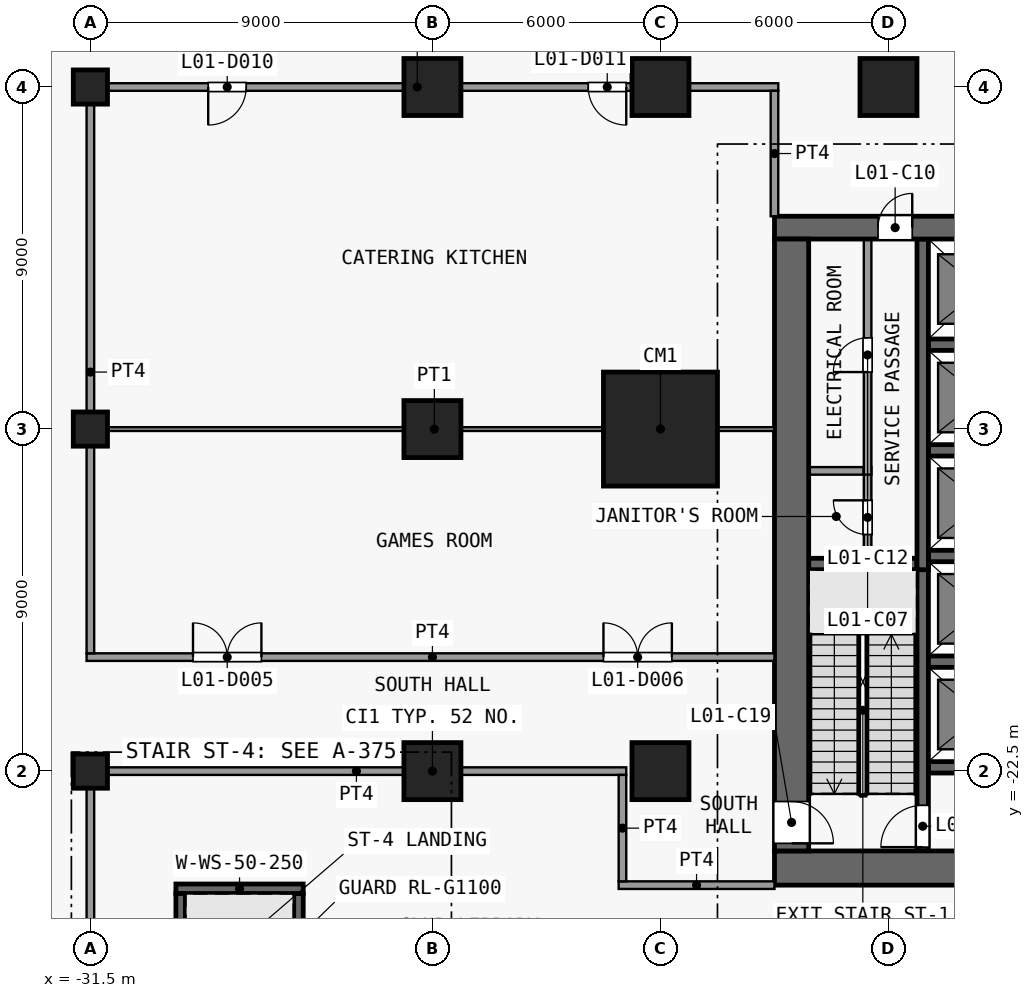
"""IFC4 building model, lengths in metres.
Left out: names, types, materials, properties, quantities, classifications, styles, units other than length and angle.
Written with IfcOpenShell. Run it as: python <this file> out.ifc"""

import sys

from ifc_helpers import new_model, si_unit, direction, frame, frame_2d, origin, origin_2d, place, context, subcontext, project, spatial, rectangle, extrude, element, fill, save


model = new_model("IFC4")
c1 = context("Model", 3, precision=1e-05, world=origin(), true_north=direction((0.0, 1.0)))
c2 = subcontext(c1, "Body", "Model", "MODEL_VIEW")
j1 = project(units=[si_unit("LENGTHUNIT", "METRE"), si_unit("PLANEANGLEUNIT", "RADIAN")], contexts=[c1])
p1 = place(None, origin())
s1 = spatial("IfcSite", under=j1, at=p1, CompositionType="ELEMENT")
p2 = place(p1, origin())
s2 = spatial("IfcBuilding", under=s1, at=p2, CompositionType="ELEMENT")
p3 = place(p2, frame((0.0, 0.0, 8.0)))
s3 = spatial("IfcBuildingStorey", under=s2, at=p3, CompositionType="ELEMENT", Elevation=8.0)
for number, where, z_axis, x_axis in (
    (1, (-31.5, -22.5, 0.0), (0.0, 0.0, 1.0), (1.0, 0.0, 0.0)),
    (2, (-31.5, -13.5, 0.0), (0.0, 0.0, 1.0), (1.0, 0.0, 0.0)),
    (3, (-31.5, -4.5, 0.0), (0.0, 0.0, 1.0), (1.0, 0.0, 0.0)),
):
    element("IfcColumn", number, at=place(p3, frame(where, z_axis=z_axis, x_axis=x_axis)), inside=s3, PredefinedType="COLUMN", context=c2, shape_type="SweptSolid", body=[
        extrude(rectangle(XDim=0.9, YDim=0.9, at=origin_2d()), origin(), (0.0, 0.0, 1.0), 5.5),
    ])
for number, where, z_axis, x_axis in (
    (4, (-22.5, -22.5, 0.0), (0.0, 0.0, 1.0), (1.0, 0.0, 0.0)),
    (5, (-22.5, -13.5, 0.0), (0.0, 0.0, 1.0), (1.0, 0.0, 0.0)),
    (6, (-22.5, -4.5, 0.0), (0.0, 0.0, 1.0), (1.0, 0.0, 0.0)),
    (7, (-16.5, -22.5, 0.0), (0.0, 0.0, 1.0), (1.0, 0.0, 0.0)),
):
    element("IfcColumn", number, at=place(p3, frame(where, z_axis=z_axis, x_axis=x_axis)), inside=s3, PredefinedType="COLUMN", context=c2, shape_type="SweptSolid", body=[
        extrude(rectangle(XDim=1.5, YDim=1.5, at=origin_2d()), origin(), (0.0, 0.0, 1.0), 5.5),
    ])
p4 = place(p3, frame((-16.5, -13.5, 0.0), z_axis=(0.0, 0.0, 1.0), x_axis=(1.0, 0.0, 0.0)))
e8 = element("IfcColumn", 8, at=p4, inside=s3, PredefinedType="COLUMN", context=c2, shape_type="SweptSolid", body=[
    extrude(rectangle(XDim=3.0, YDim=3.0, at=origin_2d()), origin(), (0.0, 0.0, 1.0), 5.5),
])
for number, where, z_axis, x_axis in (
    (9, (-16.5, -4.5, 0.0), (0.0, 0.0, 1.0), (1.0, 0.0, 0.0)),
    (10, (-10.5, -4.5, 0.0), (0.0, 0.0, 1.0), (1.0, 0.0, 0.0)),
):
    element("IfcColumn", number, at=place(p3, frame(where, z_axis=z_axis, x_axis=x_axis)), inside=s3, PredefinedType="COLUMN", context=c2, shape_type="SweptSolid", body=[
        extrude(rectangle(XDim=1.5, YDim=1.5, at=origin_2d()), origin(), (0.0, 0.0, 1.0), 5.5),
    ])
p5 = place(p3, frame((-13.5, -25.05, 0.0), z_axis=(0.0, 0.0, 1.0), x_axis=(1.0, 0.0, 0.0)))
e11 = element("IfcWall", 11, at=p5, inside=s3, PredefinedType="SHEAR", context=c2, shape_type="SweptSolid", body=[
    extrude(rectangle(XDim=27.0, YDim=0.9, at=frame_2d((13.5, 0.0))), origin(), (0.0, 0.0, 1.0), 5.15),
])
p6 = place(p3, frame((-13.5, -8.2, 0.0), z_axis=(0.0, 0.0, 1.0), x_axis=(1.0, 0.0, 0.0)))
e12 = element("IfcWall", 12, at=p6, inside=s3, PredefinedType="SHEAR", context=c2, shape_type="SweptSolid", body=[
    extrude(rectangle(XDim=27.0, YDim=0.6, at=frame_2d((13.5, 0.0))), origin(), (0.0, 0.0, 1.0), 5.15),
])
p7 = place(p6, frame((7.8, 0.0, 0.0)))
e13 = element("IfcOpeningElement", 13, at=p7, cuts=e12, PredefinedType="OPENING", context=c2, shape_type="SweptSolid", body=[
    extrude(rectangle(XDim=1.8, YDim=2.1, at=frame_2d((0.9, 1.05))), frame((0.0, 0.31, 0.0), z_axis=(0.0, -1.0, 0.0), x_axis=(1.0, 0.0, 0.0)), (0.0, 0.0, 1.0), 0.62),
])
p8 = place(p6, frame((17.4, 0.0, 0.0)))
e14 = element("IfcOpeningElement", 14, at=p8, cuts=e12, PredefinedType="OPENING", context=c2, shape_type="SweptSolid", body=[
    extrude(rectangle(XDim=1.8, YDim=2.1, at=frame_2d((0.9, 1.05))), frame((0.0, 0.31, 0.0), z_axis=(0.0, -1.0, 0.0), x_axis=(1.0, 0.0, 0.0)), (0.0, 0.0, 1.0), 0.62),
])
p9 = place(p6, frame((2.725, 0.0, 0.0)))
e15 = element("IfcOpeningElement", 15, at=p9, cuts=e12, PredefinedType="OPENING", context=c2, shape_type="SweptSolid", body=[
    extrude(rectangle(XDim=0.9, YDim=2.1, at=frame_2d((0.45, 1.05))), frame((0.0, 0.31, 0.0), z_axis=(0.0, -1.0, 0.0), x_axis=(1.0, 0.0, 0.0)), (0.0, 0.0, 1.0), 0.62),
])
p10 = place(p6, frame((23.375, 0.0, 0.0)))
e16 = element("IfcOpeningElement", 16, at=p10, cuts=e12, PredefinedType="OPENING", context=c2, shape_type="SweptSolid", body=[
    extrude(rectangle(XDim=0.9, YDim=2.1, at=frame_2d((0.45, 1.05))), frame((0.0, 0.31, 0.0), z_axis=(0.0, -1.0, 0.0), x_axis=(1.0, 0.0, 0.0)), (0.0, 0.0, 1.0), 0.62),
])
p11 = place(p3, frame((-13.05, -8.5, 0.0), z_axis=(0.0, 0.0, 1.0), x_axis=(0.0, -1.0, 0.0)))
e17 = element("IfcWall", 17, at=p11, inside=s3, PredefinedType="SHEAR", context=c2, shape_type="SweptSolid", body=[
    extrude(rectangle(XDim=16.1, YDim=0.9, at=frame_2d((8.05, 0.0))), origin(), (0.0, 0.0, 1.0), 5.15),
])
p12 = place(p11, frame((14.8, 0.0, 0.0)))
e18 = element("IfcOpeningElement", 18, at=p12, cuts=e17, PredefinedType="OPENING", context=c2, shape_type="SweptSolid", body=[
    extrude(rectangle(XDim=1.1, YDim=2.1, at=frame_2d((0.55, 1.05))), frame((0.0, 0.46, 0.0), z_axis=(0.0, -1.0, 0.0), x_axis=(1.0, 0.0, 0.0)), (0.0, 0.0, 1.0), 0.92),
])
for number, where, z_axis, x_axis in (
    (19, (-9.45, -22.4, 0.0), (0.0, 0.0, 1.0), (1.0, 0.0, 0.0)),
    (20, (-9.45, -19.62, 0.0), (0.0, 0.0, 1.0), (1.0, 0.0, 0.0)),
):
    element("IfcWall", number, at=place(p3, frame(where, z_axis=z_axis, x_axis=x_axis)), inside=s3, PredefinedType="SHEAR", context=c2, shape_type="SweptSolid", body=[
        extrude(rectangle(XDim=2.8, YDim=0.3, at=frame_2d((1.4, 0.0))), origin(), (0.0, 0.0, 1.0), 5.15),
    ])
p13 = place(p3, frame((-12.6, -17.05, 0.0), z_axis=(0.0, 0.0, 1.0), x_axis=(1.0, 0.0, 0.0)))
e21 = element("IfcWall", 21, at=p13, inside=s3, PredefinedType="SHEAR", context=c2, shape_type="SweptSolid", body=[
    extrude(rectangle(XDim=2.85, YDim=0.3, at=frame_2d((1.425, 0.0))), origin(), (0.0, 0.0, 1.0), 5.15),
])
p14 = place(p3, frame((-9.45, -16.84, 0.0), z_axis=(0.0, 0.0, 1.0), x_axis=(1.0, 0.0, 0.0)))
e22 = element("IfcWall", 22, at=p14, inside=s3, PredefinedType="SHEAR", context=c2, shape_type="SweptSolid", body=[
    extrude(rectangle(XDim=2.8, YDim=0.3, at=frame_2d((1.4, 0.0))), origin(), (0.0, 0.0, 1.0), 5.15),
])
p15 = place(p3, frame((-12.6, -14.6, 0.0), z_axis=(0.0, 0.0, 1.0), x_axis=(1.0, 0.0, 0.0)))
e23 = element("IfcWall", 23, at=p15, inside=s3, PredefinedType="PARTITIONING", context=c2, shape_type="SweptSolid", body=[
    extrude(rectangle(XDim=1.45, YDim=0.2, at=frame_2d((0.725, 0.0))), origin(), (0.0, 0.0, 1.0), 5.15),
])
for number, where, z_axis, x_axis in (
    (24, (-9.45, -14.06, 0.0), (0.0, 0.0, 1.0), (1.0, 0.0, 0.0)),
    (25, (-9.45, -11.28, 0.0), (0.0, 0.0, 1.0), (1.0, 0.0, 0.0)),
):
    element("IfcWall", number, at=place(p3, frame(where, z_axis=z_axis, x_axis=x_axis)), inside=s3, PredefinedType="SHEAR", context=c2, shape_type="SweptSolid", body=[
        extrude(rectangle(XDim=2.8, YDim=0.3, at=frame_2d((1.4, 0.0))), origin(), (0.0, 0.0, 1.0), 5.15),
    ])
p16 = place(p3, frame((-11.05, -16.9, 0.0), z_axis=(0.0, 0.0, 1.0), x_axis=(0.0, 1.0, 0.0)))
e26 = element("IfcWall", 26, at=p16, inside=s3, PredefinedType="PARTITIONING", context=c2, shape_type="SweptSolid", body=[
    extrude(rectangle(XDim=2.4, YDim=0.2, at=frame_2d((1.2, 0.0))), origin(), (0.0, 0.0, 1.0), 5.15),
])
p17 = place(p16, frame((0.625, 0.0, 0.0)))
e27 = element("IfcOpeningElement", 27, at=p17, cuts=e26, PredefinedType="OPENING", context=c2, shape_type="SweptSolid", body=[
    extrude(rectangle(XDim=0.9, YDim=2.1, at=frame_2d((0.45, 1.05))), frame((0.0, 0.11, 0.0), z_axis=(0.0, -1.0, 0.0), x_axis=(1.0, 0.0, 0.0)), (0.0, 0.0, 1.0), 0.22),
])
p18 = place(p3, frame((-11.05, -14.7, 0.0), z_axis=(0.0, 0.0, 1.0), x_axis=(0.0, 1.0, 0.0)))
e28 = element("IfcWall", 28, at=p18, inside=s3, PredefinedType="PARTITIONING", context=c2, shape_type="SweptSolid", body=[
    extrude(rectangle(XDim=6.2, YDim=0.2, at=frame_2d((3.1, 0.0))), origin(), (0.0, 0.0, 1.0), 5.15),
])
p19 = place(p18, frame((2.7, 0.0, 0.0)))
e29 = element("IfcOpeningElement", 29, at=p19, cuts=e28, PredefinedType="OPENING", context=c2, shape_type="SweptSolid", body=[
    extrude(rectangle(XDim=0.9, YDim=2.1, at=frame_2d((0.45, 1.05))), frame((0.0, 0.11, 0.0), z_axis=(0.0, -1.0, 0.0), x_axis=(1.0, 0.0, 0.0)), (0.0, 0.0, 1.0), 0.22),
])
p20 = place(p3, frame((-9.6, -24.6, 0.0), z_axis=(0.0, 0.0, 1.0), x_axis=(0.0, 1.0, 0.0)))
e30 = element("IfcWall", 30, at=p20, inside=s3, PredefinedType="SHEAR", context=c2, shape_type="SweptSolid", body=[
    extrude(rectangle(XDim=7.7, YDim=0.3, at=frame_2d((3.85, 0.0))), origin(), (0.0, 0.0, 1.0), 5.15),
])
p21 = place(p20, frame((0.1, 0.0, 0.0)))
e31 = element("IfcOpeningElement", 31, at=p21, cuts=e30, PredefinedType="OPENING", context=c2, shape_type="SweptSolid", body=[
    extrude(rectangle(XDim=1.1, YDim=2.1, at=frame_2d((0.55, 1.05))), frame((0.0, 0.16, 0.0), z_axis=(0.0, -1.0, 0.0), x_axis=(1.0, 0.0, 0.0)), (0.0, 0.0, 1.0), 0.32),
])
p22 = place(p3, frame((-9.6, -17.2, 0.0), z_axis=(0.0, 0.0, 1.0), x_axis=(0.0, 1.0, 0.0)))
e32 = element("IfcWall", 32, at=p22, inside=s3, PredefinedType="SHEAR", context=c2, shape_type="SweptSolid", body=[
    extrude(rectangle(XDim=8.7, YDim=0.3, at=frame_2d((4.35, 0.0))), origin(), (0.0, 0.0, 1.0), 5.15),
])
for number, where, z_axis, x_axis in (
    (33, (-29.125, -27.07, 0.0), (0.0, 0.0, 1.0), (0.0, 1.0, 0.0)),
    (34, (-26.025, -27.07, 0.0), (0.0, 0.0, 1.0), (0.0, 1.0, 0.0)),
):
    element("IfcWall", number, at=place(p3, frame(where, z_axis=z_axis, x_axis=x_axis)), inside=s3, PredefinedType="SHEAR", context=c2, shape_type="SweptSolid", body=[
        extrude(rectangle(XDim=1.35, YDim=0.25, at=frame_2d((0.675, 0.0))), origin(), (0.0, 0.0, 1.0), 5.15),
    ])
p23 = place(p3, frame((-29.25, -25.595, 0.0), z_axis=(0.0, 0.0, 1.0), x_axis=(1.0, 0.0, 0.0)))
e35 = element("IfcWall", 35, at=p23, inside=s3, PredefinedType="SHEAR", context=c2, shape_type="SweptSolid", body=[
    extrude(rectangle(XDim=3.35, YDim=0.25, at=frame_2d((1.675, 0.0))), origin(), (0.0, 0.0, 1.0), 5.15),
])
p24 = place(p3, frame((-17.6, -25.5, 0.0), z_axis=(0.0, 0.0, 1.0), x_axis=(1.0, 0.0, 0.0)))
e36 = element("IfcWall", 36, at=p24, inside=s3, PredefinedType="PARTITIONING", context=c2, shape_type="SweptSolid", body=[
    extrude(rectangle(XDim=4.1, YDim=0.2, at=frame_2d((2.05, 0.0))), origin(), (0.0, 0.0, 1.0), 5.15),
])
p25 = place(p3, frame((-31.6, -22.5, 0.0), z_axis=(0.0, 0.0, 1.0), x_axis=(1.0, 0.0, 0.0)))
e37 = element("IfcWall", 37, at=p25, inside=s3, PredefinedType="PARTITIONING", context=c2, shape_type="SweptSolid", body=[
    extrude(rectangle(XDim=14.2, YDim=0.2, at=frame_2d((7.1, 0.0))), origin(), (0.0, 0.0, 1.0), 5.15),
])
p26 = place(p3, frame((-31.6, -19.5, 0.0), z_axis=(0.0, 0.0, 1.0), x_axis=(1.0, 0.0, 0.0)))
e38 = element("IfcWall", 38, at=p26, inside=s3, PredefinedType="PARTITIONING", context=c2, shape_type="SweptSolid", body=[
    extrude(rectangle(XDim=18.1, YDim=0.2, at=frame_2d((9.05, 0.0))), origin(), (0.0, 0.0, 1.0), 5.15),
])
p27 = place(p26, frame((2.8, 0.0, 0.0)))
e39 = element("IfcOpeningElement", 39, at=p27, cuts=e38, PredefinedType="OPENING", context=c2, shape_type="SweptSolid", body=[
    extrude(rectangle(XDim=1.8, YDim=2.1, at=frame_2d((0.9, 1.05))), frame((0.0, 0.11, 0.0), z_axis=(0.0, -1.0, 0.0), x_axis=(1.0, 0.0, 0.0)), (0.0, 0.0, 1.0), 0.22),
])
p28 = place(p26, frame((13.6, 0.0, 0.0)))
e40 = element("IfcOpeningElement", 40, at=p28, cuts=e38, PredefinedType="OPENING", context=c2, shape_type="SweptSolid", body=[
    extrude(rectangle(XDim=1.8, YDim=2.1, at=frame_2d((0.9, 1.05))), frame((0.0, 0.11, 0.0), z_axis=(0.0, -1.0, 0.0), x_axis=(1.0, 0.0, 0.0)), (0.0, 0.0, 1.0), 0.22),
])
p29 = place(p3, frame((-31.4, -13.5, 0.0), z_axis=(0.0, 0.0, 1.0), x_axis=(1.0, 0.0, 0.0)))
e41 = element("IfcWall", 41, at=p29, inside=s3, PredefinedType="PARTITIONING", context=c2, shape_type="SweptSolid", body=[
    extrude(rectangle(XDim=17.9, YDim=0.1, at=frame_2d((8.95, 0.0))), origin(), (0.0, 0.0, 1.0), 5.15),
])
p30 = place(p3, frame((-31.6, -4.5, 0.0), z_axis=(0.0, 0.0, 1.0), x_axis=(1.0, 0.0, 0.0)))
e42 = element("IfcWall", 42, at=p30, inside=s3, PredefinedType="PARTITIONING", context=c2, shape_type="SweptSolid", body=[
    extrude(rectangle(XDim=18.2, YDim=0.2, at=frame_2d((9.1, 0.0))), origin(), (0.0, 0.0, 1.0), 5.15),
])
p31 = place(p30, frame((3.2, 0.0, 0.0)))
e43 = element("IfcOpeningElement", 43, at=p31, cuts=e42, PredefinedType="OPENING", context=c2, shape_type="SweptSolid", body=[
    extrude(rectangle(XDim=1.0, YDim=2.1, at=frame_2d((0.5, 1.05))), frame((0.0, 0.11, 0.0), z_axis=(0.0, -1.0, 0.0), x_axis=(1.0, 0.0, 0.0)), (0.0, 0.0, 1.0), 0.22),
])
p32 = place(p30, frame((13.2, 0.0, 0.0)))
e44 = element("IfcOpeningElement", 44, at=p32, cuts=e42, PredefinedType="OPENING", context=c2, shape_type="SweptSolid", body=[
    extrude(rectangle(XDim=1.0, YDim=2.1, at=frame_2d((0.5, 1.05))), frame((0.0, 0.11, 0.0), z_axis=(0.0, -1.0, 0.0), x_axis=(1.0, 0.0, 0.0)), (0.0, 0.0, 1.0), 0.22),
])
p33 = place(p3, frame((-31.5, -31.4, 0.0), z_axis=(0.0, 0.0, 1.0), x_axis=(0.0, 1.0, 0.0)))
e45 = element("IfcWall", 45, at=p33, inside=s3, PredefinedType="PARTITIONING", context=c2, shape_type="SweptSolid", body=[
    extrude(rectangle(XDim=8.8, YDim=0.2, at=frame_2d((4.4, 0.0))), origin(), (0.0, 0.0, 1.0), 5.15),
])
p34 = place(p3, frame((-31.5, -19.4, 0.0), z_axis=(0.0, 0.0, 1.0), x_axis=(0.0, 1.0, 0.0)))
e46 = element("IfcWall", 46, at=p34, inside=s3, PredefinedType="PARTITIONING", context=c2, shape_type="SweptSolid", body=[
    extrude(rectangle(XDim=14.8, YDim=0.2, at=frame_2d((7.4, 0.0))), origin(), (0.0, 0.0, 1.0), 5.15),
])
p35 = place(p3, frame((-17.5, -25.4, 0.0), z_axis=(0.0, 0.0, 1.0), x_axis=(0.0, 1.0, 0.0)))
e47 = element("IfcWall", 47, at=p35, inside=s3, PredefinedType="PARTITIONING", context=c2, shape_type="SweptSolid", body=[
    extrude(rectangle(XDim=2.8, YDim=0.2, at=frame_2d((1.4, 0.0))), origin(), (0.0, 0.0, 1.0), 5.15),
])
p36 = place(p3, frame((-13.5, -7.9, 0.0), z_axis=(0.0, 0.0, 1.0), x_axis=(0.0, 1.0, 0.0)))
e48 = element("IfcWall", 48, at=p36, inside=s3, PredefinedType="PARTITIONING", context=c2, shape_type="SweptSolid", body=[
    extrude(rectangle(XDim=3.3, YDim=0.2, at=frame_2d((1.65, 0.0))), origin(), (0.0, 0.0, 1.0), 5.15),
])
p37 = place(p19, origin())
e49 = element("IfcDoor", 49, at=p37, inside=s3, OperationType="SINGLE_SWING_LEFT", PredefinedType="DOOR", context=c2, shape_type="SweptSolid", body=[
    extrude(rectangle(XDim=0.9, YDim=2.1, at=frame_2d((0.45, 1.05))), frame((0.0, 0.025, 0.0), z_axis=(0.0, -1.0, 0.0), x_axis=(1.0, 0.0, 0.0)), (0.0, 0.0, 1.0), 0.05),
])
fill(e29, e49)
p38 = place(p9, origin())
e50 = element("IfcDoor", 50, at=p38, inside=s3, OperationType="SINGLE_SWING_RIGHT", PredefinedType="DOOR", context=c2, shape_type="SweptSolid", body=[
    extrude(rectangle(XDim=0.9, YDim=2.1, at=frame_2d((0.45, 1.05))), frame((0.0, 0.025, 0.0), z_axis=(0.0, -1.0, 0.0), x_axis=(1.0, 0.0, 0.0)), (0.0, 0.0, 1.0), 0.05),
])
fill(e15, e50)
p39 = place(p17, origin())
e51 = element("IfcDoor", 51, at=p39, inside=s3, OperationType="SINGLE_SWING_RIGHT", PredefinedType="DOOR", context=c2, shape_type="SweptSolid", body=[
    extrude(rectangle(XDim=0.9, YDim=2.1, at=frame_2d((0.45, 1.05))), frame((0.0, 0.025, 0.0), z_axis=(0.0, -1.0, 0.0), x_axis=(1.0, 0.0, 0.0)), (0.0, 0.0, 1.0), 0.05),
])
fill(e27, e51)
p40 = place(p21, origin())
e52 = element("IfcDoor", 52, at=p40, inside=s3, OperationType="SINGLE_SWING_LEFT", PredefinedType="DOOR", context=c2, shape_type="SweptSolid", body=[
    extrude(rectangle(XDim=1.1, YDim=2.1, at=frame_2d((0.55, 1.05))), frame((0.0, 0.025, 0.0), z_axis=(0.0, -1.0, 0.0), x_axis=(1.0, 0.0, 0.0)), (0.0, 0.0, 1.0), 0.05),
])
fill(e31, e52)
p41 = place(p12, origin())
e53 = element("IfcDoor", 53, at=p41, inside=s3, OperationType="SINGLE_SWING_RIGHT", PredefinedType="DOOR", context=c2, shape_type="SweptSolid", body=[
    extrude(rectangle(XDim=1.1, YDim=2.1, at=frame_2d((0.55, 1.05))), frame((0.0, 0.025, 0.0), z_axis=(0.0, -1.0, 0.0), x_axis=(1.0, 0.0, 0.0)), (0.0, 0.0, 1.0), 0.05),
])
fill(e18, e53)
p42 = place(p27, origin())
e54 = element("IfcDoor", 54, at=p42, inside=s3, OperationType="DOUBLE_DOOR_SINGLE_SWING", PredefinedType="DOOR", context=c2, shape_type="SweptSolid", body=[
    extrude(rectangle(XDim=1.8, YDim=2.1, at=frame_2d((0.9, 1.05))), frame((0.0, 0.025, 0.0), z_axis=(0.0, -1.0, 0.0), x_axis=(1.0, 0.0, 0.0)), (0.0, 0.0, 1.0), 0.05),
])
fill(e39, e54)
p43 = place(p28, origin())
e55 = element("IfcDoor", 55, at=p43, inside=s3, OperationType="DOUBLE_DOOR_SINGLE_SWING", PredefinedType="DOOR", context=c2, shape_type="SweptSolid", body=[
    extrude(rectangle(XDim=1.8, YDim=2.1, at=frame_2d((0.9, 1.05))), frame((0.0, 0.025, 0.0), z_axis=(0.0, -1.0, 0.0), x_axis=(1.0, 0.0, 0.0)), (0.0, 0.0, 1.0), 0.05),
])
fill(e40, e55)
p44 = place(p31, origin())
e56 = element("IfcDoor", 56, at=p44, inside=s3, OperationType="SINGLE_SWING_LEFT", PredefinedType="DOOR", context=c2, shape_type="SweptSolid", body=[
    extrude(rectangle(XDim=1.0, YDim=2.1, at=frame_2d((0.5, 1.05))), frame((0.0, 0.025, 0.0), z_axis=(0.0, -1.0, 0.0), x_axis=(1.0, 0.0, 0.0)), (0.0, 0.0, 1.0), 0.05),
])
fill(e43, e56)
p45 = place(p32, origin())
e57 = element("IfcDoor", 57, at=p45, inside=s3, OperationType="SINGLE_SWING_RIGHT", PredefinedType="DOOR", context=c2, shape_type="SweptSolid", body=[
    extrude(rectangle(XDim=1.0, YDim=2.1, at=frame_2d((0.5, 1.05))), frame((0.0, 0.025, 0.0), z_axis=(0.0, -1.0, 0.0), x_axis=(1.0, 0.0, 0.0)), (0.0, 0.0, 1.0), 0.05),
])
fill(e44, e57)
save(model, sys.argv[1])
